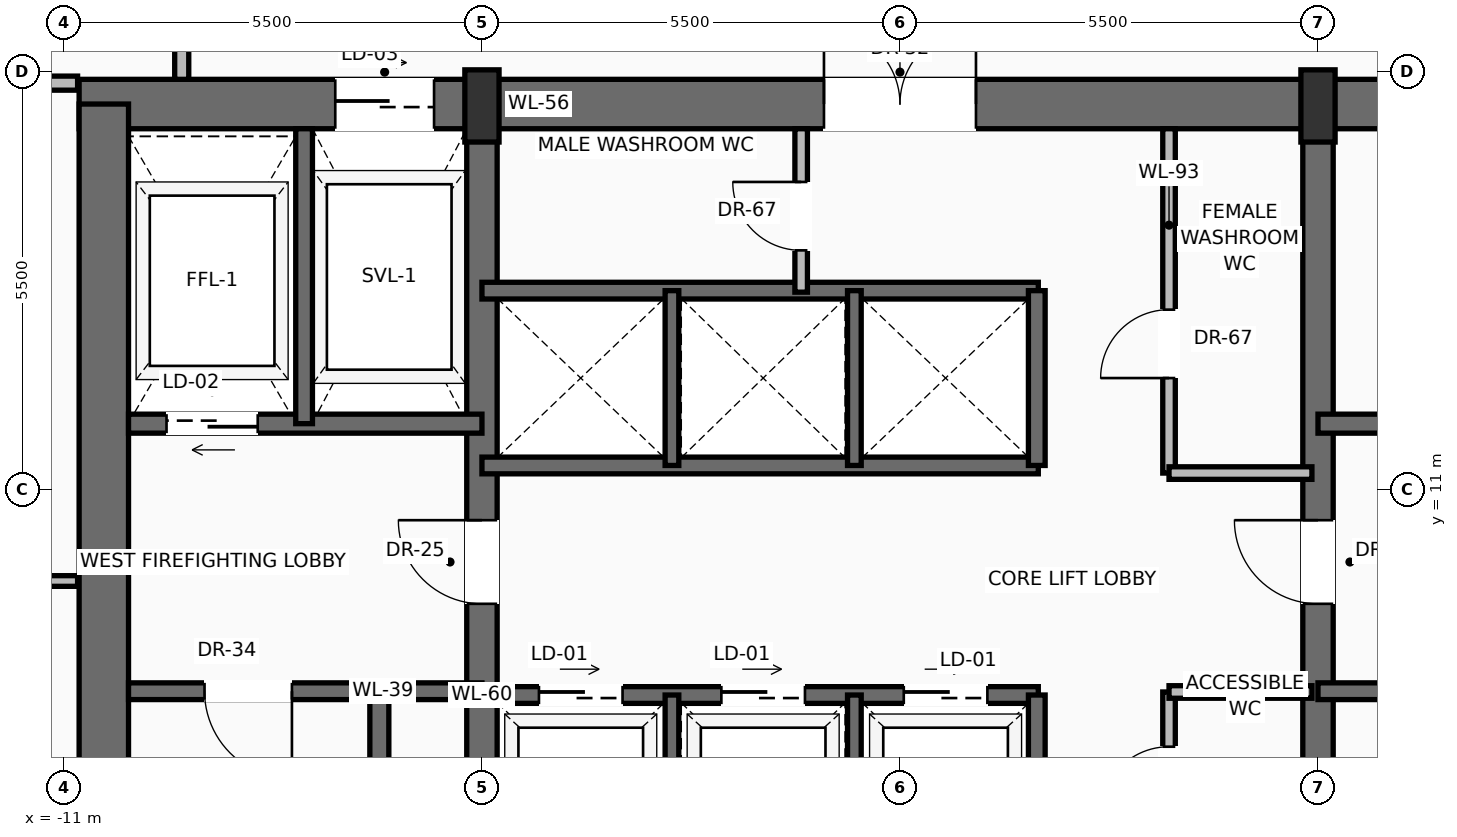
"""IFC4 building model, lengths in metres.
Left out: names, types, materials, properties, quantities, classifications, styles, units other than length and angle.
Written with IfcOpenShell. Run it as: python <this file> out.ifc"""

import sys

from ifc_helpers import new_model, si_unit, direction, frame, frame_2d, origin, origin_2d, place, context, subcontext, project, spatial, rectangle, extrude, source, transform, mapped, element, fill, save


model = new_model("IFC4")
c1 = context("Model", 3, precision=1e-05, world=origin(), true_north=direction((0.0, 1.0)))
c2 = subcontext(c1, "Body", "Model", "MODEL_VIEW")
j1 = project(units=[si_unit("LENGTHUNIT", "METRE"), si_unit("PLANEANGLEUNIT", "RADIAN")], contexts=[c1])
p1 = place(None, origin())
s1 = spatial("IfcSite", under=j1, at=p1, CompositionType="ELEMENT")
p2 = place(p1, origin())
s2 = spatial("IfcBuilding", under=s1, at=p2, CompositionType="ELEMENT")
p3 = place(p2, frame((0.0, 0.0, 174.7)))
s3 = spatial("IfcBuildingStorey", under=s2, at=p3, CompositionType="ELEMENT", Elevation=174.7)
p4 = place(p3, frame((-10.8, 16.075, 0.0), z_axis=(0.0, 0.0, 1.0), x_axis=(1.0, 0.0, 0.0)))
e1 = element("IfcWall", 1, at=p4, inside=s3, PredefinedType="SHEAR", context=c2, shape_type="SweptSolid", body=[
    extrude(rectangle(XDim=21.6, YDim=0.65, at=frame_2d((10.8, 0.0))), origin(), (0.0, 0.0, 1.0), 3.47),
])
p5 = place(p4, frame((3.37, 0.0, 0.0)))
e2 = element("IfcOpeningElement", 2, at=p5, cuts=e1, PredefinedType="OPENING", context=c2, shape_type="SweptSolid", body=[
    extrude(rectangle(XDim=1.3, YDim=2.3, at=frame_2d((0.65, 1.15))), frame((0.0, 0.335, 0.0), z_axis=(0.0, -1.0, 0.0), x_axis=(1.0, 0.0, 0.0)), (0.0, 0.0, 1.0), 0.67),
])
p6 = place(p4, frame((9.8, 0.0, 0.0)))
e3 = element("IfcOpeningElement", 3, at=p6, cuts=e1, PredefinedType="OPENING", context=c2, shape_type="SweptSolid", body=[
    extrude(rectangle(XDim=2.0, YDim=2.4, at=frame_2d((1.0, 1.2))), frame((0.0, 0.335, 0.0), z_axis=(0.0, -1.0, 0.0), x_axis=(1.0, 0.0, 0.0)), (0.0, 0.0, 1.0), 0.67),
])
p7 = place(p3, frame((-10.475, 0.525, 0.0), z_axis=(0.0, 0.0, 1.0), x_axis=(0.0, 1.0, 0.0)))
e4 = element("IfcWall", 4, at=p7, inside=s3, PredefinedType="SHEAR", context=c2, shape_type="SweptSolid", body=[
    extrude(rectangle(XDim=15.55, YDim=0.65, at=frame_2d((7.775, 0.0))), origin(), (0.0, 0.0, 1.0), 3.47),
])
p8 = place(p3, frame((-5.5, 0.525, 0.0), z_axis=(0.0, 0.0, 1.0), x_axis=(0.0, 1.0, 0.0)))
e5 = element("IfcWall", 5, at=p8, inside=s3, PredefinedType="SHEAR", context=c2, shape_type="SweptSolid", body=[
    extrude(rectangle(XDim=15.55, YDim=0.4, at=frame_2d((7.775, 0.0))), origin(), (0.0, 0.0, 1.0), 3.47),
])
p9 = place(p8, frame((8.975, 0.0, 0.0)))
e6 = element("IfcOpeningElement", 6, at=p9, cuts=e5, PredefinedType="OPENING", context=c2, shape_type="SweptSolid", body=[
    extrude(rectangle(XDim=1.1, YDim=2.2, at=frame_2d((0.55, 1.1))), frame((0.0, 0.21, 0.0), z_axis=(0.0, -1.0, 0.0), x_axis=(1.0, 0.0, 0.0)), (0.0, 0.0, 1.0), 0.42),
])
p10 = place(p3, frame((5.5, 0.525, 0.0), z_axis=(0.0, 0.0, 1.0), x_axis=(0.0, 1.0, 0.0)))
e7 = element("IfcWall", 7, at=p10, inside=s3, PredefinedType="SHEAR", context=c2, shape_type="SweptSolid", body=[
    extrude(rectangle(XDim=15.55, YDim=0.4, at=frame_2d((7.775, 0.0))), origin(), (0.0, 0.0, 1.0), 3.47),
])
p11 = place(p10, frame((8.975, 0.0, 0.0)))
e8 = element("IfcOpeningElement", 8, at=p11, cuts=e7, PredefinedType="OPENING", context=c2, shape_type="SweptSolid", body=[
    extrude(rectangle(XDim=1.1, YDim=2.2, at=frame_2d((0.55, 1.1))), frame((0.0, 0.21, 0.0), z_axis=(0.0, -1.0, 0.0), x_axis=(1.0, 0.0, 0.0)), (0.0, 0.0, 1.0), 0.42),
])
m1 = source(origin(), c2, "Body", "SweptSolid", [
    extrude(rectangle(XDim=0.45, YDim=0.95, at=origin_2d()), origin(), (0.0, 0.0, 1.0), 3.7),
])
for number, where, z_axis, x_axis in (
    (9, (-5.5, 16.05, 0.0), (0.0, 0.0, 1.0), (1.0, 0.0, 0.0)),
    (10, (5.5, 16.05, 0.0), (0.0, 0.0, 1.0), (1.0, 0.0, 0.0)),
):
    element("IfcColumn", number, at=place(p3, frame(where, z_axis=z_axis, x_axis=x_axis)), inside=s3, PredefinedType="PILASTER", context=c2, shape_type="MappedRepresentation", body=[
        mapped(m1, transform((0.0, 0.0, 0.0), scale=1.0)),
    ])
p12 = place(p3, frame((-20.519, 16.514, 0.0), z_axis=(0.0, 0.0, 1.0), x_axis=(0.531871143151, 0.846825299034, 0.0)))
e11 = element("IfcWall", 11, at=p12, inside=s3, PredefinedType="SOLIDWALL", context=c2, shape_type="SweptSolid", body=[
    extrude(rectangle(XDim=18.777, YDim=0.28, at=frame_2d((9.388, 0.0))), origin(), (0.0, 0.0, 1.0), 3.05),
])
p13 = place(p12, frame((4.506, 0.0, 0.0)))
e12 = element("IfcOpeningElement", 12, at=p13, cuts=e11, PredefinedType="OPENING", context=c2, shape_type="SweptSolid", body=[
    extrude(rectangle(XDim=1.6, YDim=2.35, at=frame_2d((0.8, 1.175))), frame((0.0, 0.15, 0.0), z_axis=(0.0, -1.0, 0.0), x_axis=(1.0, 0.0, 0.0)), (0.0, 0.0, 1.0), 0.3),
])
p14 = place(p12, frame((12.768, 0.0, 0.9)))
e13 = element("IfcOpeningElement", 13, at=p14, cuts=e11, PredefinedType="OPENING", context=c2, shape_type="SweptSolid", body=[
    extrude(rectangle(XDim=2.0, YDim=1.85, at=frame_2d((1.0, 0.925))), frame((0.0, 0.15, 0.0), z_axis=(0.0, -1.0, 0.0), x_axis=(1.0, 0.0, 0.0)), (0.0, 0.0, 1.0), 0.3),
])
p15 = place(p3, frame((-6.85, 0.85, 0.0), z_axis=(0.0, 0.0, 1.0), x_axis=(0.0, 1.0, 0.0)))
e14 = element("IfcWall", 14, at=p15, inside=s3, PredefinedType="SOLIDWALL", context=c2, shape_type="SweptSolid", body=[
    extrude(rectangle(XDim=7.5, YDim=0.25, at=frame_2d((3.75, 0.0))), origin(), (0.0, 0.0, 1.0), 3.47),
])
p16 = place(p3, frame((-5.5, 8.35, 0.0), z_axis=(0.0, 0.0, 1.0), x_axis=(-1.0, 0.0, 0.0)))
e15 = element("IfcWall", 15, at=p16, inside=s3, PredefinedType="SOLIDWALL", context=c2, shape_type="SweptSolid", body=[
    extrude(rectangle(XDim=4.65, YDim=0.22, at=frame_2d((2.325, 0.0))), origin(), (0.0, 0.0, 1.0), 3.47),
])
p17 = place(p16, frame((2.5, 0.0, 0.0)))
e16 = element("IfcOpeningElement", 16, at=p17, cuts=e15, PredefinedType="OPENING", context=c2, shape_type="SweptSolid", body=[
    extrude(rectangle(XDim=1.15, YDim=2.2, at=frame_2d((0.575, 1.1))), frame((0.0, 0.12, 0.0), z_axis=(0.0, -1.0, 0.0), x_axis=(1.0, 0.0, 0.0)), (0.0, 0.0, 1.0), 0.24),
])
p18 = place(p3, frame((-5.5, 11.87, 0.0), z_axis=(0.0, 0.0, 1.0), x_axis=(-1.0, 0.0, 0.0)))
e17 = element("IfcWall", 17, at=p18, inside=s3, PredefinedType="SOLIDWALL", context=c2, shape_type="SweptSolid", body=[
    extrude(rectangle(XDim=4.65, YDim=0.25, at=frame_2d((2.325, 0.0))), origin(), (0.0, 0.0, 1.0), 3.47),
])
p19 = place(p18, frame((2.95, 0.0, 0.0)))
e18 = element("IfcOpeningElement", 18, at=p19, cuts=e17, PredefinedType="OPENING", context=c2, shape_type="SweptSolid", body=[
    extrude(rectangle(XDim=1.2, YDim=2.25, at=frame_2d((0.6, 1.125))), frame((0.0, 0.135, 0.0), z_axis=(0.0, -1.0, 0.0), x_axis=(1.0, 0.0, 0.0)), (0.0, 0.0, 1.0), 0.27),
])
p20 = place(p3, frame((-7.84, 11.87, 0.0), z_axis=(0.0, 0.0, 1.0), x_axis=(0.0, 1.0, 0.0)))
e19 = element("IfcWall", 19, at=p20, inside=s3, PredefinedType="SOLIDWALL", context=c2, shape_type="SweptSolid", body=[
    extrude(rectangle(XDim=3.88, YDim=0.22, at=frame_2d((1.94, 0.0))), origin(), (0.0, 0.0, 1.0), 3.47),
])
p21 = place(p3, frame((10.15, 8.35, 0.0), z_axis=(0.0, 0.0, 1.0), x_axis=(-1.0, 0.0, 0.0)))
e20 = element("IfcWall", 20, at=p21, inside=s3, PredefinedType="SOLIDWALL", context=c2, shape_type="SweptSolid", body=[
    extrude(rectangle(XDim=4.65, YDim=0.22, at=frame_2d((2.325, 0.0))), origin(), (0.0, 0.0, 1.0), 3.47),
])
p22 = place(p21, frame((1.0, 0.0, 0.0)))
e21 = element("IfcOpeningElement", 21, at=p22, cuts=e20, PredefinedType="OPENING", context=c2, shape_type="SweptSolid", body=[
    extrude(rectangle(XDim=1.15, YDim=2.2, at=frame_2d((0.575, 1.1))), frame((0.0, 0.12, 0.0), z_axis=(0.0, -1.0, 0.0), x_axis=(1.0, 0.0, 0.0)), (0.0, 0.0, 1.0), 0.24),
])
p23 = place(p3, frame((10.15, 11.87, 0.0), z_axis=(0.0, 0.0, 1.0), x_axis=(-1.0, 0.0, 0.0)))
e22 = element("IfcWall", 22, at=p23, inside=s3, PredefinedType="SOLIDWALL", context=c2, shape_type="SweptSolid", body=[
    extrude(rectangle(XDim=4.65, YDim=0.25, at=frame_2d((2.325, 0.0))), origin(), (0.0, 0.0, 1.0), 3.47),
])
p24 = place(p23, frame((0.5, 0.0, 0.0)))
e23 = element("IfcOpeningElement", 23, at=p24, cuts=e22, PredefinedType="OPENING", context=c2, shape_type="SweptSolid", body=[
    extrude(rectangle(XDim=1.2, YDim=2.25, at=frame_2d((0.6, 1.125))), frame((0.0, 0.135, 0.0), z_axis=(0.0, -1.0, 0.0), x_axis=(1.0, 0.0, 0.0)), (0.0, 0.0, 1.0), 0.27),
])
p25 = place(p3, frame((3.54, 6.0, 0.0), z_axis=(0.0, 0.0, 1.0), x_axis=(0.0, 1.0, 0.0)))
e24 = element("IfcWall", 24, at=p25, inside=s3, PredefinedType="PARTITIONING", context=c2, shape_type="SweptSolid", body=[
    extrude(rectangle(XDim=2.34, YDim=0.165, at=frame_2d((1.17, 0.0))), origin(), (0.0, 0.0, 1.0), 3.462),
])
p26 = place(p25, frame((0.72, 0.0, 0.0)))
e25 = element("IfcOpeningElement", 25, at=p26, cuts=e24, PredefinedType="OPENING", context=c2, shape_type="SweptSolid", body=[
    extrude(rectangle(XDim=0.9, YDim=2.1, at=frame_2d((0.45, 1.05))), frame((0.0, 0.093, 0.0), z_axis=(0.0, -1.0, 0.0), x_axis=(1.0, 0.0, 0.0)), (0.0, 0.0, 1.0), 0.185),
])
p27 = place(p3, frame((3.54, 8.34, 0.0), z_axis=(0.0, 0.0, 1.0), x_axis=(1.0, 0.0, 0.0)))
e26 = element("IfcWall", 26, at=p27, inside=s3, PredefinedType="PARTITIONING", context=c2, shape_type="SweptSolid", body=[
    extrude(rectangle(XDim=1.88, YDim=0.165, at=frame_2d((0.94, 0.0))), origin(), (0.0, 0.0, 1.0), 3.462),
])
p28 = place(p3, frame((-5.5, 8.3, 0.0), z_axis=(0.0, 0.0, 1.0), x_axis=(1.0, 0.0, 0.0)))
e27 = element("IfcWall", 27, at=p28, inside=s3, PredefinedType="SOLIDWALL", context=c2, shape_type="SweptSolid", body=[
    extrude(rectangle(XDim=7.32, YDim=0.22, at=frame_2d((3.66, 0.0))), origin(), (0.0, 0.0, 1.0), 3.47),
])
p29 = place(p28, frame((0.75, 0.0, 0.0)))
e28 = element("IfcOpeningElement", 28, at=p29, cuts=e27, PredefinedType="OPENING", context=c2, shape_type="SweptSolid", body=[
    extrude(rectangle(XDim=1.1, YDim=2.2, at=frame_2d((0.55, 1.1))), frame((0.0, 0.12, 0.0), z_axis=(0.0, -1.0, 0.0), x_axis=(1.0, 0.0, 0.0)), (0.0, 0.0, 1.0), 0.24),
])
p30 = place(p28, frame((3.15, 0.0, 0.0)))
e29 = element("IfcOpeningElement", 29, at=p30, cuts=e27, PredefinedType="OPENING", context=c2, shape_type="SweptSolid", body=[
    extrude(rectangle(XDim=1.1, YDim=2.2, at=frame_2d((0.55, 1.1))), frame((0.0, 0.12, 0.0), z_axis=(0.0, -1.0, 0.0), x_axis=(1.0, 0.0, 0.0)), (0.0, 0.0, 1.0), 0.24),
])
p31 = place(p28, frame((5.55, 0.0, 0.0)))
e30 = element("IfcOpeningElement", 30, at=p31, cuts=e27, PredefinedType="OPENING", context=c2, shape_type="SweptSolid", body=[
    extrude(rectangle(XDim=1.1, YDim=2.2, at=frame_2d((0.55, 1.1))), frame((0.0, 0.12, 0.0), z_axis=(0.0, -1.0, 0.0), x_axis=(1.0, 0.0, 0.0)), (0.0, 0.0, 1.0), 0.24),
])
p32 = place(p3, frame((1.8, 6.0, 0.0), z_axis=(0.0, 0.0, 1.0), x_axis=(0.0, 1.0, 0.0)))
e31 = element("IfcWall", 31, at=p32, inside=s3, PredefinedType="SOLIDWALL", context=c2, shape_type="SweptSolid", body=[
    extrude(rectangle(XDim=2.3, YDim=0.22, at=frame_2d((1.15, 0.0))), origin(), (0.0, 0.0, 1.0), 3.47),
])
for number, where, z_axis, x_axis in (
    (32, (-3.0, 6.0, 0.0), (0.0, 0.0, 1.0), (0.0, 1.0, 0.0)),
    (33, (-0.6, 6.0, 0.0), (0.0, 0.0, 1.0), (0.0, 1.0, 0.0)),
):
    element("IfcWall", number, at=place(p3, frame(where, z_axis=z_axis, x_axis=x_axis)), inside=s3, PredefinedType="SOLIDWALL", context=c2, shape_type="SweptSolid", body=[
        extrude(rectangle(XDim=2.3, YDim=0.18, at=frame_2d((1.15, 0.0))), origin(), (0.0, 0.0, 1.0), 3.47),
    ])
for number, where, z_axis, x_axis in (
    (34, (-5.5, 11.32, 0.0), (0.0, 0.0, 1.0), (1.0, 0.0, 0.0)),
    (35, (-5.5, 13.62, 0.0), (0.0, 0.0, 1.0), (1.0, 0.0, 0.0)),
):
    element("IfcWall", number, at=place(p3, frame(where, z_axis=z_axis, x_axis=x_axis)), inside=s3, PredefinedType="SOLIDWALL", context=c2, shape_type="SweptSolid", body=[
        extrude(rectangle(XDim=7.32, YDim=0.22, at=frame_2d((3.66, 0.0))), origin(), (0.0, 0.0, 1.0), 3.47),
    ])
p33 = place(p3, frame((1.8, 11.32, 0.0), z_axis=(0.0, 0.0, 1.0), x_axis=(0.0, 1.0, 0.0)))
e36 = element("IfcWall", 36, at=p33, inside=s3, PredefinedType="SOLIDWALL", context=c2, shape_type="SweptSolid", body=[
    extrude(rectangle(XDim=2.3, YDim=0.22, at=frame_2d((1.15, 0.0))), origin(), (0.0, 0.0, 1.0), 3.47),
])
for number, where, z_axis, x_axis in (
    (37, (-3.0, 11.32, 0.0), (0.0, 0.0, 1.0), (0.0, 1.0, 0.0)),
    (38, (-0.6, 11.32, 0.0), (0.0, 0.0, 1.0), (0.0, 1.0, 0.0)),
):
    element("IfcWall", number, at=place(p3, frame(where, z_axis=z_axis, x_axis=x_axis)), inside=s3, PredefinedType="SOLIDWALL", context=c2, shape_type="SweptSolid", body=[
        extrude(rectangle(XDim=2.3, YDim=0.18, at=frame_2d((1.15, 0.0))), origin(), (0.0, 0.0, 1.0), 3.47),
    ])
p34 = place(p3, frame((-1.3, 13.6, 0.0), z_axis=(0.0, 0.0, 1.0), x_axis=(0.0, 1.0, 0.0)))
e39 = element("IfcWall", 39, at=p34, inside=s3, PredefinedType="PARTITIONING", context=c2, shape_type="SweptSolid", body=[
    extrude(rectangle(XDim=2.15, YDim=0.165, at=frame_2d((1.075, 0.0))), origin(), (0.0, 0.0, 1.0), 3.462),
])
p35 = place(p34, frame((0.55, 0.0, 0.0)))
e40 = element("IfcOpeningElement", 40, at=p35, cuts=e39, PredefinedType="OPENING", context=c2, shape_type="SweptSolid", body=[
    extrude(rectangle(XDim=0.9, YDim=2.1, at=frame_2d((0.45, 1.05))), frame((0.0, 0.093, 0.0), z_axis=(0.0, -1.0, 0.0), x_axis=(1.0, 0.0, 0.0)), (0.0, 0.0, 1.0), 0.185),
])
p36 = place(p3, frame((3.54, 11.22, 0.0), z_axis=(0.0, 0.0, 1.0), x_axis=(0.0, 1.0, 0.0)))
e41 = element("IfcWall", 41, at=p36, inside=s3, PredefinedType="PARTITIONING", context=c2, shape_type="SweptSolid", body=[
    extrude(rectangle(XDim=4.53, YDim=0.165, at=frame_2d((2.265, 0.0))), origin(), (0.0, 0.0, 1.0), 3.462),
])
p37 = place(p36, frame((1.25, 0.0, 0.0)))
e42 = element("IfcOpeningElement", 42, at=p37, cuts=e41, PredefinedType="OPENING", context=c2, shape_type="SweptSolid", body=[
    extrude(rectangle(XDim=0.9, YDim=2.1, at=frame_2d((0.45, 1.05))), frame((0.0, 0.093, 0.0), z_axis=(0.0, -1.0, 0.0), x_axis=(1.0, 0.0, 0.0)), (0.0, 0.0, 1.0), 0.185),
])
p38 = place(p3, frame((3.54, 11.22, 0.0), z_axis=(0.0, 0.0, 1.0), x_axis=(1.0, 0.0, 0.0)))
e43 = element("IfcWall", 43, at=p38, inside=s3, PredefinedType="PARTITIONING", context=c2, shape_type="SweptSolid", body=[
    extrude(rectangle(XDim=1.88, YDim=0.165, at=frame_2d((0.94, 0.0))), origin(), (0.0, 0.0, 1.0), 3.462),
])
p39 = place(p3, frame((-9.45, 16.4, 0.0), z_axis=(0.0, 0.0, 1.0), x_axis=(0.0, 1.0, 0.0)))
e44 = element("IfcWall", 44, at=p39, inside=s3, PredefinedType="PARTITIONING", context=c2, shape_type="SweptSolid", body=[
    extrude(rectangle(XDim=9.2, YDim=0.185, at=frame_2d((4.6, 0.0))), origin(), (0.0, 0.0, 1.0), 2.846),
])
p40 = place(p39, frame((3.699, 0.0, 0.0)))
e45 = element("IfcOpeningElement", 45, at=p40, cuts=e44, PredefinedType="OPENING", context=c2, shape_type="SweptSolid", body=[
    extrude(rectangle(XDim=0.95, YDim=2.2, at=frame_2d((0.475, 1.1))), frame((0.0, 0.103, 0.0), z_axis=(0.0, -1.0, 0.0), x_axis=(1.0, 0.0, 0.0)), (0.0, 0.0, 1.0), 0.205),
])
p41 = place(p39, frame((5.988, 0.0, 0.0)))
e46 = element("IfcOpeningElement", 46, at=p41, cuts=e44, PredefinedType="OPENING", context=c2, shape_type="SweptSolid", body=[
    extrude(rectangle(XDim=0.95, YDim=2.2, at=frame_2d((0.475, 1.1))), frame((0.0, 0.103, 0.0), z_axis=(0.0, -1.0, 0.0), x_axis=(1.0, 0.0, 0.0)), (0.0, 0.0, 1.0), 0.205),
])
p42 = place(p3, frame((-20.776, 16.35, 0.0), z_axis=(0.0, 0.0, 1.0), x_axis=(1.0, 0.0, 0.0)))
e47 = element("IfcWall", 47, at=p42, inside=s3, PredefinedType="PARTITIONING", context=c2, shape_type="SweptSolid", body=[
    extrude(rectangle(XDim=9.956, YDim=0.185, at=frame_2d((4.978, 0.0))), origin(), (0.0, 0.0, 1.0), 3.462),
])
p43 = place(p42, frame((5.894, 0.0, 0.0)))
e48 = element("IfcOpeningElement", 48, at=p43, cuts=e47, PredefinedType="OPENING", context=c2, shape_type="SweptSolid", body=[
    extrude(rectangle(XDim=0.95, YDim=2.2, at=frame_2d((0.475, 1.1))), frame((0.0, 0.103, 0.0), z_axis=(0.0, -1.0, 0.0), x_axis=(1.0, 0.0, 0.0)), (0.0, 0.0, 1.0), 0.205),
])
p44 = place(p3, frame((-24.89, 9.8, 0.0), z_axis=(0.0, 0.0, 1.0), x_axis=(1.0, 0.0, 0.0)))
e49 = element("IfcWall", 49, at=p44, inside=s3, PredefinedType="PARTITIONING", context=c2, shape_type="SweptSolid", body=[
    extrude(rectangle(XDim=14.07, YDim=0.14, at=frame_2d((7.035, 0.0))), origin(), (0.0, 0.0, 1.0), 3.049),
])
p45 = place(p44, frame((6.567, 0.0, 0.0)))
e50 = element("IfcOpeningElement", 50, at=p45, cuts=e49, PredefinedType="OPENING", context=c2, shape_type="SweptSolid", body=[
    extrude(rectangle(XDim=0.95, YDim=2.2, at=frame_2d((0.475, 1.1))), frame((0.0, 0.08, 0.0), z_axis=(0.0, -1.0, 0.0), x_axis=(1.0, 0.0, 0.0)), (0.0, 0.0, 1.0), 0.16),
])
m2 = source(origin(), c2, "Body", "SweptSolid", [
    extrude(rectangle(XDim=1.15, YDim=2.2, at=frame_2d((0.575, 1.1))), frame((0.0, 0.025, 0.0), z_axis=(0.0, -1.0, 0.0), x_axis=(1.0, 0.0, 0.0)), (0.0, 0.0, 1.0), 0.05),
])
p46 = place(p17, origin())
e51 = element("IfcDoor", 51, at=p46, inside=s3, OperationType="SINGLE_SWING_LEFT", PredefinedType="DOOR", context=c2, shape_type="MappedRepresentation", body=[
    mapped(m2, transform((0.0, 0.0, 0.0), scale=1.0)),
])
fill(e16, e51)
m3 = source(origin(), c2, "Body", "SweptSolid", [
    extrude(rectangle(XDim=1.1, YDim=2.2, at=frame_2d((0.55, 1.1))), frame((0.0, 0.025, 0.0), z_axis=(0.0, -1.0, 0.0), x_axis=(1.0, 0.0, 0.0)), (0.0, 0.0, 1.0), 0.05),
])
p47 = place(p9, origin())
e52 = element("IfcDoor", 52, at=p47, inside=s3, OperationType="SINGLE_SWING_RIGHT", PredefinedType="DOOR", context=c2, shape_type="MappedRepresentation", body=[
    mapped(m3, transform((0.0, 0.0, 0.0), scale=1.0)),
])
fill(e6, e52)
m4 = source(origin(), c2, "Body", "SweptSolid", [
    extrude(rectangle(XDim=1.2, YDim=2.25, at=frame_2d((0.6, 1.125))), frame((0.0, 0.025, 0.0), z_axis=(0.0, -1.0, 0.0), x_axis=(1.0, 0.0, 0.0)), (0.0, 0.0, 1.0), 0.05),
])
p48 = place(p19, origin())
e53 = element("IfcDoor", 53, at=p48, inside=s3, OperationType="SLIDING_TO_LEFT", PredefinedType="DOOR", context=c2, shape_type="MappedRepresentation", body=[
    mapped(m4, transform((0.0, 0.0, 0.0), scale=1.0)),
])
fill(e18, e53)
m5 = source(origin(), c2, "Body", "SweptSolid", [
    extrude(rectangle(XDim=1.3, YDim=2.3, at=frame_2d((0.65, 1.15))), frame((0.0, 0.025, 0.0), z_axis=(0.0, -1.0, 0.0), x_axis=(1.0, 0.0, 0.0)), (0.0, 0.0, 1.0), 0.05),
])
p49 = place(p5, origin())
e54 = element("IfcDoor", 54, at=p49, inside=s3, OperationType="SLIDING_TO_RIGHT", PredefinedType="DOOR", context=c2, shape_type="MappedRepresentation", body=[
    mapped(m5, transform((0.0, 0.0, 0.0), scale=1.0)),
])
fill(e2, e54)
p50 = place(p11, origin())
e55 = element("IfcDoor", 55, at=p50, inside=s3, OperationType="SINGLE_SWING_RIGHT", PredefinedType="DOOR", context=c2, shape_type="MappedRepresentation", body=[
    mapped(m3, transform((0.0, 0.0, 0.0), scale=1.0)),
])
fill(e8, e55)
m6 = source(origin(), c2, "Body", "SweptSolid", [
    extrude(rectangle(XDim=2.0, YDim=2.4, at=frame_2d((1.0, 1.2))), frame((0.0, 0.025, 0.0), z_axis=(0.0, -1.0, 0.0), x_axis=(1.0, 0.0, 0.0)), (0.0, 0.0, 1.0), 0.05),
])
p51 = place(p6, origin())
e56 = element("IfcDoor", 56, at=p51, inside=s3, OperationType="DOUBLE_DOOR_SINGLE_SWING", PredefinedType="DOOR", context=c2, shape_type="MappedRepresentation", body=[
    mapped(m6, transform((0.0, 0.0, 0.0), scale=1.0)),
])
fill(e3, e56)
m7 = source(origin(), c2, "Body", "SweptSolid", [
    extrude(rectangle(XDim=0.9, YDim=2.1, at=frame_2d((0.45, 1.05))), frame((0.0, 0.025, 0.0), z_axis=(0.0, -1.0, 0.0), x_axis=(1.0, 0.0, 0.0)), (0.0, 0.0, 1.0), 0.05),
])
p52 = place(p26, origin())
e57 = element("IfcDoor", 57, at=p52, inside=s3, OperationType="SINGLE_SWING_LEFT", PredefinedType="DOOR", context=c2, shape_type="MappedRepresentation", body=[
    mapped(m7, transform((0.0, 0.0, 0.0), scale=1.0)),
])
fill(e25, e57)
m8 = source(origin(), c2, "Body", "SweptSolid", [
    extrude(rectangle(XDim=1.1, YDim=2.2, at=frame_2d((0.55, 1.1))), frame((0.0, 0.025, 0.0), z_axis=(0.0, -1.0, 0.0), x_axis=(1.0, 0.0, 0.0)), (0.0, 0.0, 1.0), 0.05),
])
p53 = place(p29, origin())
e58 = element("IfcDoor", 58, at=p53, inside=s3, OperationType="SLIDING_TO_LEFT", PredefinedType="DOOR", context=c2, shape_type="MappedRepresentation", body=[
    mapped(m8, transform((0.0, 0.0, 0.0), scale=1.0)),
])
fill(e28, e58)
p54 = place(p30, origin())
e59 = element("IfcDoor", 59, at=p54, inside=s3, OperationType="SLIDING_TO_LEFT", PredefinedType="DOOR", context=c2, shape_type="MappedRepresentation", body=[
    mapped(m8, transform((0.0, 0.0, 0.0), scale=1.0)),
])
fill(e29, e59)
p55 = place(p31, origin())
e60 = element("IfcDoor", 60, at=p55, inside=s3, OperationType="SLIDING_TO_LEFT", PredefinedType="DOOR", context=c2, shape_type="MappedRepresentation", body=[
    mapped(m8, transform((0.0, 0.0, 0.0), scale=1.0)),
])
fill(e30, e60)
p56 = place(p35, origin())
e61 = element("IfcDoor", 61, at=p56, inside=s3, OperationType="SINGLE_SWING_RIGHT", PredefinedType="DOOR", context=c2, shape_type="MappedRepresentation", body=[
    mapped(m7, transform((0.0, 0.0, 0.0), scale=1.0)),
])
fill(e40, e61)
p57 = place(p37, origin())
e62 = element("IfcDoor", 62, at=p57, inside=s3, OperationType="SINGLE_SWING_LEFT", PredefinedType="DOOR", context=c2, shape_type="MappedRepresentation", body=[
    mapped(m7, transform((0.0, 0.0, 0.0), scale=1.0)),
])
fill(e42, e62)
save(model, sys.argv[1])
